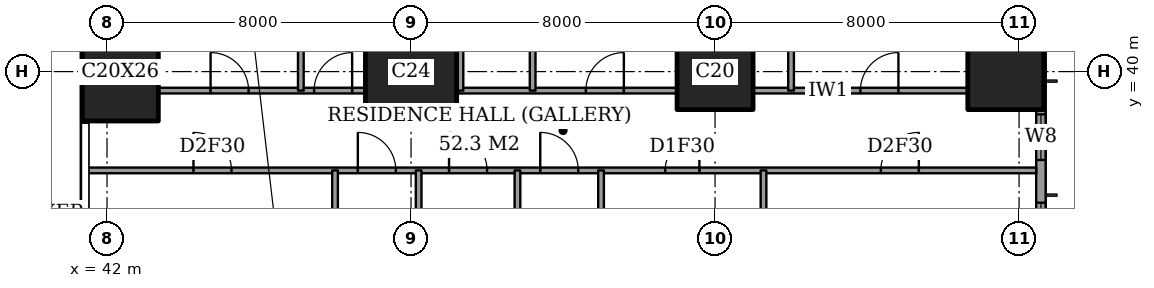
"""IFC4 building model, lengths in metres.
Left out: names, types, materials, properties, quantities, classifications, styles, units other than length and angle.
Written with IfcOpenShell. Run it as: python <this file> out.ifc"""

import sys

from ifc_helpers import new_model, si_unit, direction, frame, frame_2d, origin, origin_2d, place, context, subcontext, project, spatial, rectangle, extrude, element, fill, save


model = new_model("IFC4")
c1 = context("Model", 3, precision=1e-05, world=origin(), true_north=direction((0.0, 1.0)))
c2 = subcontext(c1, "Body", "Model", "MODEL_VIEW")
j1 = project(units=[si_unit("LENGTHUNIT", "METRE"), si_unit("PLANEANGLEUNIT", "RADIAN")], contexts=[c1])
p1 = place(None, origin())
s1 = spatial("IfcSite", under=j1, at=p1, CompositionType="ELEMENT")
p2 = place(p1, origin())
s2 = spatial("IfcBuilding", under=s1, at=p2, CompositionType="ELEMENT")
p3 = place(p2, frame((0.0, 0.0, 29.6)))
s3 = spatial("IfcBuildingStorey", under=s2, at=p3, CompositionType="ELEMENT", Elevation=29.6)
p4 = place(p3, frame((42.35, 40.0, 0.0), z_axis=(0.0, 0.0, 1.0), x_axis=(1.0, 0.0, 0.0)))
e1 = element("IfcColumn", 1, at=p4, inside=s3, PredefinedType="COLUMN", context=c2, shape_type="SweptSolid", body=[
    extrude(rectangle(XDim=2.0, YDim=2.6, at=origin_2d()), origin(), (0.0, 0.0, 1.0), 3.6),
])
p5 = place(p3, frame((50.0, 40.0, 0.0), z_axis=(0.0, 0.0, 1.0), x_axis=(1.0, 0.0, 0.0)))
e2 = element("IfcColumn", 2, at=p5, inside=s3, PredefinedType="COLUMN", context=c2, shape_type="SweptSolid", body=[
    extrude(rectangle(XDim=2.4, YDim=2.4, at=origin_2d()), origin(), (0.0, 0.0, 1.0), 3.6),
])
for number, where, z_axis, x_axis in (
    (3, (58.0, 40.0, 0.0), (0.0, 0.0, 1.0), (1.0, 0.0, 0.0)),
    (4, (65.65, 40.0, 0.0), (0.0, 0.0, 1.0), (1.0, 0.0, 0.0)),
):
    element("IfcColumn", number, at=place(p3, frame(where, z_axis=z_axis, x_axis=x_axis)), inside=s3, PredefinedType="COLUMN", context=c2, shape_type="SweptSolid", body=[
        extrude(rectangle(XDim=2.0, YDim=2.0, at=origin_2d()), origin(), (0.0, 0.0, 1.0), 3.6),
    ])
p6 = place(p3, frame((66.575, 3.175, 0.0), z_axis=(0.0, 0.0, 1.0), x_axis=(0.0, 1.0, 0.0)))
e5 = element("IfcWall", 5, at=p6, inside=s3, PredefinedType="SOLIDWALL", context=c2, shape_type="SweptSolid", body=[
    extrude(rectangle(XDim=41.65, YDim=0.25, at=frame_2d((20.825, 0.0))), origin(), (0.0, 0.0, 1.0), 3.6),
])
p7 = place(p6, frame((0.775, 0.0, 0.6)))
e6 = element("IfcOpeningElement", 6, at=p7, cuts=e5, PredefinedType="OPENING", context=c2, shape_type="SweptSolid", body=[
    extrude(rectangle(XDim=2.4, YDim=2.0, at=frame_2d((1.2, 1.0))), frame((0.0, 0.135, 0.0), z_axis=(0.0, -1.0, 0.0), x_axis=(1.0, 0.0, 0.0)), (0.0, 0.0, 1.0), 0.27),
])
p8 = place(p6, frame((6.1, 0.0, 0.6)))
e7 = element("IfcOpeningElement", 7, at=p8, cuts=e5, PredefinedType="OPENING", context=c2, shape_type="SweptSolid", body=[
    extrude(rectangle(XDim=1.2, YDim=2.0, at=frame_2d((0.6, 1.0))), frame((0.0, 0.135, 0.0), z_axis=(0.0, -1.0, 0.0), x_axis=(1.0, 0.0, 0.0)), (0.0, 0.0, 1.0), 0.27),
])
p9 = place(p6, frame((8.275, 0.0, 0.6)))
e8 = element("IfcOpeningElement", 8, at=p9, cuts=e5, PredefinedType="OPENING", context=c2, shape_type="SweptSolid", body=[
    extrude(rectangle(XDim=2.4, YDim=2.0, at=frame_2d((1.2, 1.0))), frame((0.0, 0.135, 0.0), z_axis=(0.0, -1.0, 0.0), x_axis=(1.0, 0.0, 0.0)), (0.0, 0.0, 1.0), 0.27),
])
p10 = place(p6, frame((15.775, 0.0, 0.6)))
e9 = element("IfcOpeningElement", 9, at=p10, cuts=e5, PredefinedType="OPENING", context=c2, shape_type="SweptSolid", body=[
    extrude(rectangle(XDim=2.4, YDim=2.0, at=frame_2d((1.2, 1.0))), frame((0.0, 0.135, 0.0), z_axis=(0.0, -1.0, 0.0), x_axis=(1.0, 0.0, 0.0)), (0.0, 0.0, 1.0), 0.27),
])
p11 = place(p6, frame((23.475, 0.0, 0.6)))
e10 = element("IfcOpeningElement", 10, at=p11, cuts=e5, PredefinedType="OPENING", context=c2, shape_type="SweptSolid", body=[
    extrude(rectangle(XDim=2.4, YDim=2.0, at=frame_2d((1.2, 1.0))), frame((0.0, 0.135, 0.0), z_axis=(0.0, -1.0, 0.0), x_axis=(1.0, 0.0, 0.0)), (0.0, 0.0, 1.0), 0.27),
])
p12 = place(p6, frame((30.975, 0.0, 0.6)))
e11 = element("IfcOpeningElement", 11, at=p12, cuts=e5, PredefinedType="OPENING", context=c2, shape_type="SweptSolid", body=[
    extrude(rectangle(XDim=2.4, YDim=2.0, at=frame_2d((1.2, 1.0))), frame((0.0, 0.135, 0.0), z_axis=(0.0, -1.0, 0.0), x_axis=(1.0, 0.0, 0.0)), (0.0, 0.0, 1.0), 0.27),
])
p13 = place(p6, frame((34.5, 0.0, 0.6)))
e12 = element("IfcOpeningElement", 12, at=p13, cuts=e5, PredefinedType="OPENING", context=c2, shape_type="SweptSolid", body=[
    extrude(rectangle(XDim=1.2, YDim=2.0, at=frame_2d((0.6, 1.0))), frame((0.0, 0.135, 0.0), z_axis=(0.0, -1.0, 0.0), x_axis=(1.0, 0.0, 0.0)), (0.0, 0.0, 1.0), 0.27),
])
p14 = place(p6, frame((38.475, 0.0, 0.6)))
e13 = element("IfcOpeningElement", 13, at=p14, cuts=e5, PredefinedType="OPENING", context=c2, shape_type="SweptSolid", body=[
    extrude(rectangle(XDim=2.4, YDim=2.0, at=frame_2d((1.2, 1.0))), frame((0.0, 0.135, 0.0), z_axis=(0.0, -1.0, 0.0), x_axis=(1.0, 0.0, 0.0)), (0.0, 0.0, 1.0), 0.27),
])
p15 = place(p3, frame((41.439, 37.4, 0.0), z_axis=(0.0, 0.0, 1.0), x_axis=(1.0, 0.0, 0.0)))
e14 = element("IfcWall", 14, at=p15, inside=s3, PredefinedType="PARTITIONING", context=c2, shape_type="SweptSolid", body=[
    extrude(rectangle(XDim=25.011, YDim=0.15, at=frame_2d((12.505, 0.0))), origin(), (0.0, 0.0, 1.0), 3.35),
])
p16 = place(p15, frame((11.961, 0.0, 0.0)))
e15 = element("IfcOpeningElement", 15, at=p16, cuts=e14, PredefinedType="OPENING", context=c2, shape_type="SweptSolid", body=[
    extrude(rectangle(XDim=1.0, YDim=2.1, at=frame_2d((0.5, 1.05))), frame((0.0, 0.085, 0.0), z_axis=(0.0, -1.0, 0.0), x_axis=(1.0, 0.0, 0.0)), (0.0, 0.0, 1.0), 0.17),
])
p17 = place(p15, frame((20.924, 0.0, 0.0)))
e16 = element("IfcOpeningElement", 16, at=p17, cuts=e14, PredefinedType="OPENING", context=c2, shape_type="SweptSolid", body=[
    extrude(rectangle(XDim=1.0, YDim=2.1, at=frame_2d((0.5, 1.05))), frame((0.0, 0.085, 0.0), z_axis=(0.0, -1.0, 0.0), x_axis=(1.0, 0.0, 0.0)), (0.0, 0.0, 1.0), 0.17),
])
p18 = place(p15, frame((15.249, 0.0, 0.0)))
e17 = element("IfcOpeningElement", 17, at=p18, cuts=e14, PredefinedType="OPENING", context=c2, shape_type="SweptSolid", body=[
    extrude(rectangle(XDim=0.9, YDim=2.1, at=frame_2d((0.45, 1.05))), frame((0.0, 0.085, 0.0), z_axis=(0.0, -1.0, 0.0), x_axis=(1.0, 0.0, 0.0)), (0.0, 0.0, 1.0), 0.17),
])
p19 = place(p15, frame((9.561, 0.0, 0.0)))
e18 = element("IfcOpeningElement", 18, at=p19, cuts=e14, PredefinedType="OPENING", context=c2, shape_type="SweptSolid", body=[
    extrude(rectangle(XDim=1.0, YDim=2.1, at=frame_2d((0.5, 1.05))), frame((0.0, 0.085, 0.0), z_axis=(0.0, -1.0, 0.0), x_axis=(1.0, 0.0, 0.0)), (0.0, 0.0, 1.0), 0.17),
])
p20 = place(p15, frame((7.161, 0.0, 0.0)))
e19 = element("IfcOpeningElement", 19, at=p20, cuts=e14, PredefinedType="OPENING", context=c2, shape_type="SweptSolid", body=[
    extrude(rectangle(XDim=1.0, YDim=2.1, at=frame_2d((0.5, 1.05))), frame((0.0, 0.085, 0.0), z_axis=(0.0, -1.0, 0.0), x_axis=(1.0, 0.0, 0.0)), (0.0, 0.0, 1.0), 0.17),
])
p21 = place(p15, frame((2.836, 0.0, 0.0)))
e20 = element("IfcOpeningElement", 20, at=p21, cuts=e14, PredefinedType="OPENING", context=c2, shape_type="SweptSolid", body=[
    extrude(rectangle(XDim=1.0, YDim=2.1, at=frame_2d((0.5, 1.05))), frame((0.0, 0.085, 0.0), z_axis=(0.0, -1.0, 0.0), x_axis=(1.0, 0.0, 0.0)), (0.0, 0.0, 1.0), 0.17),
])
p22 = place(p3, frame((43.35, 39.5, 0.0), z_axis=(0.0, 0.0, 1.0), x_axis=(1.0, 0.0, 0.0)))
e21 = element("IfcWall", 21, at=p22, inside=s3, PredefinedType="PARTITIONING", context=c2, shape_type="SweptSolid", body=[
    extrude(rectangle(XDim=5.45, YDim=0.15, at=frame_2d((2.725, 0.0))), origin(), (0.0, 0.0, 1.0), 3.35),
])
p23 = place(p22, frame((4.1, 0.0, 0.0)))
e22 = element("IfcOpeningElement", 22, at=p23, cuts=e21, PredefinedType="OPENING", context=c2, shape_type="SweptSolid", body=[
    extrude(rectangle(XDim=1.0, YDim=2.1, at=frame_2d((0.5, 1.05))), frame((0.0, 0.085, 0.0), z_axis=(0.0, -1.0, 0.0), x_axis=(1.0, 0.0, 0.0)), (0.0, 0.0, 1.0), 0.17),
])
p24 = place(p22, frame((1.375, 0.0, 0.0)))
e23 = element("IfcOpeningElement", 23, at=p24, cuts=e21, PredefinedType="OPENING", context=c2, shape_type="SweptSolid", body=[
    extrude(rectangle(XDim=1.0, YDim=2.1, at=frame_2d((0.5, 1.05))), frame((0.0, 0.085, 0.0), z_axis=(0.0, -1.0, 0.0), x_axis=(1.0, 0.0, 0.0)), (0.0, 0.0, 1.0), 0.17),
])
p25 = place(p3, frame((51.2, 39.5, 0.0), z_axis=(0.0, 0.0, 1.0), x_axis=(1.0, 0.0, 0.0)))
e24 = element("IfcWall", 24, at=p25, inside=s3, PredefinedType="PARTITIONING", context=c2, shape_type="SweptSolid", body=[
    extrude(rectangle(XDim=5.8, YDim=0.15, at=frame_2d((2.9, 0.0))), origin(), (0.0, 0.0, 1.0), 3.35),
])
p26 = place(p25, frame((3.4, 0.0, 0.0)))
e25 = element("IfcOpeningElement", 25, at=p26, cuts=e24, PredefinedType="OPENING", context=c2, shape_type="SweptSolid", body=[
    extrude(rectangle(XDim=1.0, YDim=2.1, at=frame_2d((0.5, 1.05))), frame((0.0, 0.085, 0.0), z_axis=(0.0, -1.0, 0.0), x_axis=(1.0, 0.0, 0.0)), (0.0, 0.0, 1.0), 0.17),
])
p27 = place(p3, frame((59.0, 39.5, 0.0), z_axis=(0.0, 0.0, 1.0), x_axis=(1.0, 0.0, 0.0)))
e26 = element("IfcWall", 26, at=p27, inside=s3, PredefinedType="PARTITIONING", context=c2, shape_type="SweptSolid", body=[
    extrude(rectangle(XDim=5.65, YDim=0.15, at=frame_2d((2.825, 0.0))), origin(), (0.0, 0.0, 1.0), 3.35),
])
p28 = place(p27, frame((2.825, 0.0, 0.0)))
e27 = element("IfcOpeningElement", 27, at=p28, cuts=e26, PredefinedType="OPENING", context=c2, shape_type="SweptSolid", body=[
    extrude(rectangle(XDim=1.0, YDim=2.1, at=frame_2d((0.5, 1.05))), frame((0.0, 0.085, 0.0), z_axis=(0.0, -1.0, 0.0), x_axis=(1.0, 0.0, 0.0)), (0.0, 0.0, 1.0), 0.17),
])
p29 = place(p3, frame((47.1, 39.5, 0.0), z_axis=(0.0, 0.0, 1.0), x_axis=(0.0, 1.0, 0.0)))
e28 = element("IfcWall", 28, at=p29, inside=s3, PredefinedType="PARTITIONING", context=c2, shape_type="SweptSolid", body=[
    extrude(rectangle(XDim=8.95, YDim=0.15, at=frame_2d((4.475, 0.0))), origin(), (0.0, 0.0, 1.0), 3.35),
])
p30 = place(p3, frame((48.0, 28.0, 0.0), z_axis=(0.0, 0.0, 1.0), x_axis=(0.0, 1.0, 0.0)))
e29 = element("IfcWall", 29, at=p30, inside=s3, PredefinedType="PARTITIONING", context=c2, shape_type="SweptSolid", body=[
    extrude(rectangle(XDim=9.4, YDim=0.15, at=frame_2d((4.7, 0.0))), origin(), (0.0, 0.0, 1.0), 3.35),
])
p31 = place(p30, frame((0.5, 0.0, 0.0)))
e30 = element("IfcOpeningElement", 30, at=p31, cuts=e29, PredefinedType="OPENING", context=c2, shape_type="SweptSolid", body=[
    extrude(rectangle(XDim=1.0, YDim=2.1, at=frame_2d((0.5, 1.05))), frame((0.0, 0.085, 0.0), z_axis=(0.0, -1.0, 0.0), x_axis=(1.0, 0.0, 0.0)), (0.0, 0.0, 1.0), 0.17),
])
p32 = place(p3, frame((50.2, 33.2, 0.0), z_axis=(0.0, 0.0, 1.0), x_axis=(0.0, 1.0, 0.0)))
e31 = element("IfcWall", 31, at=p32, inside=s3, PredefinedType="PARTITIONING", context=c2, shape_type="SweptSolid", body=[
    extrude(rectangle(XDim=4.2, YDim=0.15, at=frame_2d((2.1, 0.0))), origin(), (0.0, 0.0, 1.0), 3.35),
])
p33 = place(p3, frame((51.3, 39.5, 0.0), z_axis=(0.0, 0.0, 1.0), x_axis=(0.0, 1.0, 0.0)))
e32 = element("IfcWall", 32, at=p33, inside=s3, PredefinedType="PARTITIONING", context=c2, shape_type="SweptSolid", body=[
    extrude(rectangle(XDim=8.95, YDim=0.15, at=frame_2d((4.475, 0.0))), origin(), (0.0, 0.0, 1.0), 3.35),
])
p34 = place(p33, frame((4.025, 0.0, 0.0)))
e33 = element("IfcOpeningElement", 33, at=p34, cuts=e32, PredefinedType="OPENING", context=c2, shape_type="SweptSolid", body=[
    extrude(rectangle(XDim=0.9, YDim=2.1, at=frame_2d((0.45, 1.05))), frame((0.0, 0.085, 0.0), z_axis=(0.0, -1.0, 0.0), x_axis=(1.0, 0.0, 0.0)), (0.0, 0.0, 1.0), 0.17),
])
p35 = place(p3, frame((52.8, 30.0, 0.0), z_axis=(0.0, 0.0, 1.0), x_axis=(0.0, 1.0, 0.0)))
e34 = element("IfcWall", 34, at=p35, inside=s3, PredefinedType="PARTITIONING", context=c2, shape_type="SweptSolid", body=[
    extrude(rectangle(XDim=7.4, YDim=0.15, at=frame_2d((3.7, 0.0))), origin(), (0.0, 0.0, 1.0), 3.35),
])
p36 = place(p3, frame((53.2, 39.5, 0.0), z_axis=(0.0, 0.0, 1.0), x_axis=(0.0, 1.0, 0.0)))
e35 = element("IfcWall", 35, at=p36, inside=s3, PredefinedType="PARTITIONING", context=c2, shape_type="SweptSolid", body=[
    extrude(rectangle(XDim=8.95, YDim=0.15, at=frame_2d((4.475, 0.0))), origin(), (0.0, 0.0, 1.0), 3.35),
])
p37 = place(p3, frame((55.0, 28.0, 0.0), z_axis=(0.0, 0.0, 1.0), x_axis=(0.0, 1.0, 0.0)))
e36 = element("IfcWall", 36, at=p37, inside=s3, PredefinedType="PARTITIONING", context=c2, shape_type="SweptSolid", body=[
    extrude(rectangle(XDim=9.4, YDim=0.15, at=frame_2d((4.7, 0.0))), origin(), (0.0, 0.0, 1.0), 3.35),
])
p38 = place(p37, frame((0.5, 0.0, 0.0)))
e37 = element("IfcOpeningElement", 37, at=p38, cuts=e36, PredefinedType="OPENING", context=c2, shape_type="SweptSolid", body=[
    extrude(rectangle(XDim=1.0, YDim=2.1, at=frame_2d((0.5, 1.05))), frame((0.0, 0.085, 0.0), z_axis=(0.0, -1.0, 0.0), x_axis=(1.0, 0.0, 0.0)), (0.0, 0.0, 1.0), 0.17),
])
p39 = place(p3, frame((59.275, 33.2, 0.0), z_axis=(0.0, 0.0, 1.0), x_axis=(0.0, 1.0, 0.0)))
e38 = element("IfcWall", 38, at=p39, inside=s3, PredefinedType="PARTITIONING", context=c2, shape_type="SweptSolid", body=[
    extrude(rectangle(XDim=4.2, YDim=0.15, at=frame_2d((2.1, 0.0))), origin(), (0.0, 0.0, 1.0), 3.35),
])
p40 = place(p3, frame((60.0, 39.5, 0.0), z_axis=(0.0, 0.0, 1.0), x_axis=(0.0, 1.0, 0.0)))
e39 = element("IfcWall", 39, at=p40, inside=s3, PredefinedType="PARTITIONING", context=c2, shape_type="SweptSolid", body=[
    extrude(rectangle(XDim=8.95, YDim=0.15, at=frame_2d((4.475, 0.0))), origin(), (0.0, 0.0, 1.0), 3.35),
])
p41 = place(p12, origin())
e40 = element("IfcWindow", 40, at=p41, inside=s3, PartitioningType="SINGLE_PANEL", PredefinedType="WINDOW", context=c2, shape_type="SweptSolid", body=[
    extrude(rectangle(XDim=2.4, YDim=2.0, at=frame_2d((1.2, 1.0))), frame((0.0, 0.03, 0.0), z_axis=(0.0, -1.0, 0.0), x_axis=(1.0, 0.0, 0.0)), (0.0, 0.0, 1.0), 0.06),
])
fill(e11, e40)
p42 = place(p13, origin())
e41 = element("IfcWindow", 41, at=p42, inside=s3, PartitioningType="SINGLE_PANEL", PredefinedType="WINDOW", context=c2, shape_type="SweptSolid", body=[
    extrude(rectangle(XDim=1.2, YDim=2.0, at=frame_2d((0.6, 1.0))), frame((0.0, 0.03, 0.0), z_axis=(0.0, -1.0, 0.0), x_axis=(1.0, 0.0, 0.0)), (0.0, 0.0, 1.0), 0.06),
])
fill(e12, e41)
p43 = place(p28, origin())
e42 = element("IfcDoor", 42, at=p43, inside=s3, OperationType="SINGLE_SWING_LEFT", PredefinedType="DOOR", context=c2, shape_type="SweptSolid", body=[
    extrude(rectangle(XDim=1.0, YDim=2.1, at=frame_2d((0.5, 1.05))), frame((0.0, 0.025, 0.0), z_axis=(0.0, -1.0, 0.0), x_axis=(1.0, 0.0, 0.0)), (0.0, 0.0, 1.0), 0.05),
])
fill(e27, e42)
p44 = place(p26, origin())
e43 = element("IfcDoor", 43, at=p44, inside=s3, OperationType="SINGLE_SWING_LEFT", PredefinedType="DOOR", context=c2, shape_type="SweptSolid", body=[
    extrude(rectangle(XDim=1.0, YDim=2.1, at=frame_2d((0.5, 1.05))), frame((0.0, 0.025, 0.0), z_axis=(0.0, -1.0, 0.0), x_axis=(1.0, 0.0, 0.0)), (0.0, 0.0, 1.0), 0.05),
])
fill(e25, e43)
p45 = place(p23, origin())
e44 = element("IfcDoor", 44, at=p45, inside=s3, OperationType="SINGLE_SWING_LEFT", PredefinedType="DOOR", context=c2, shape_type="SweptSolid", body=[
    extrude(rectangle(XDim=1.0, YDim=2.1, at=frame_2d((0.5, 1.05))), frame((0.0, 0.025, 0.0), z_axis=(0.0, -1.0, 0.0), x_axis=(1.0, 0.0, 0.0)), (0.0, 0.0, 1.0), 0.05),
])
fill(e22, e44)
p46 = place(p24, origin())
e45 = element("IfcDoor", 45, at=p46, inside=s3, OperationType="SINGLE_SWING_RIGHT", PredefinedType="DOOR", context=c2, shape_type="SweptSolid", body=[
    extrude(rectangle(XDim=1.0, YDim=2.1, at=frame_2d((0.5, 1.05))), frame((0.0, 0.025, 0.0), z_axis=(0.0, -1.0, 0.0), x_axis=(1.0, 0.0, 0.0)), (0.0, 0.0, 1.0), 0.05),
])
fill(e23, e45)
p47 = place(p16, origin())
e46 = element("IfcDoor", 46, at=p47, inside=s3, OperationType="SINGLE_SWING_RIGHT", PredefinedType="DOOR", context=c2, shape_type="SweptSolid", body=[
    extrude(rectangle(XDim=1.0, YDim=2.1, at=frame_2d((0.5, 1.05))), frame((0.0, 0.025, 0.0), z_axis=(0.0, -1.0, 0.0), x_axis=(1.0, 0.0, 0.0)), (0.0, 0.0, 1.0), 0.05),
])
fill(e15, e46)
p48 = place(p17, origin())
e47 = element("IfcDoor", 47, at=p48, inside=s3, OperationType="SINGLE_SWING_LEFT", PredefinedType="DOOR", context=c2, shape_type="SweptSolid", body=[
    extrude(rectangle(XDim=1.0, YDim=2.1, at=frame_2d((0.5, 1.05))), frame((0.0, 0.025, 0.0), z_axis=(0.0, -1.0, 0.0), x_axis=(1.0, 0.0, 0.0)), (0.0, 0.0, 1.0), 0.05),
])
fill(e16, e47)
p49 = place(p18, origin())
e48 = element("IfcDoor", 48, at=p49, inside=s3, OperationType="SINGLE_SWING_LEFT", PredefinedType="DOOR", context=c2, shape_type="SweptSolid", body=[
    extrude(rectangle(XDim=0.9, YDim=2.1, at=frame_2d((0.45, 1.05))), frame((0.0, 0.025, 0.0), z_axis=(0.0, -1.0, 0.0), x_axis=(1.0, 0.0, 0.0)), (0.0, 0.0, 1.0), 0.05),
])
fill(e17, e48)
p50 = place(p19, origin())
e49 = element("IfcDoor", 49, at=p50, inside=s3, OperationType="SINGLE_SWING_RIGHT", PredefinedType="DOOR", context=c2, shape_type="SweptSolid", body=[
    extrude(rectangle(XDim=1.0, YDim=2.1, at=frame_2d((0.5, 1.05))), frame((0.0, 0.025, 0.0), z_axis=(0.0, -1.0, 0.0), x_axis=(1.0, 0.0, 0.0)), (0.0, 0.0, 1.0), 0.05),
])
fill(e18, e49)
p51 = place(p20, origin())
e50 = element("IfcDoor", 50, at=p51, inside=s3, OperationType="SINGLE_SWING_RIGHT", PredefinedType="DOOR", context=c2, shape_type="SweptSolid", body=[
    extrude(rectangle(XDim=1.0, YDim=2.1, at=frame_2d((0.5, 1.05))), frame((0.0, 0.025, 0.0), z_axis=(0.0, -1.0, 0.0), x_axis=(1.0, 0.0, 0.0)), (0.0, 0.0, 1.0), 0.05),
])
fill(e19, e50)
p52 = place(p21, origin())
e51 = element("IfcDoor", 51, at=p52, inside=s3, OperationType="SINGLE_SWING_RIGHT", PredefinedType="DOOR", context=c2, shape_type="SweptSolid", body=[
    extrude(rectangle(XDim=1.0, YDim=2.1, at=frame_2d((0.5, 1.05))), frame((0.0, 0.025, 0.0), z_axis=(0.0, -1.0, 0.0), x_axis=(1.0, 0.0, 0.0)), (0.0, 0.0, 1.0), 0.05),
])
fill(e20, e51)
save(model, sys.argv[1])
